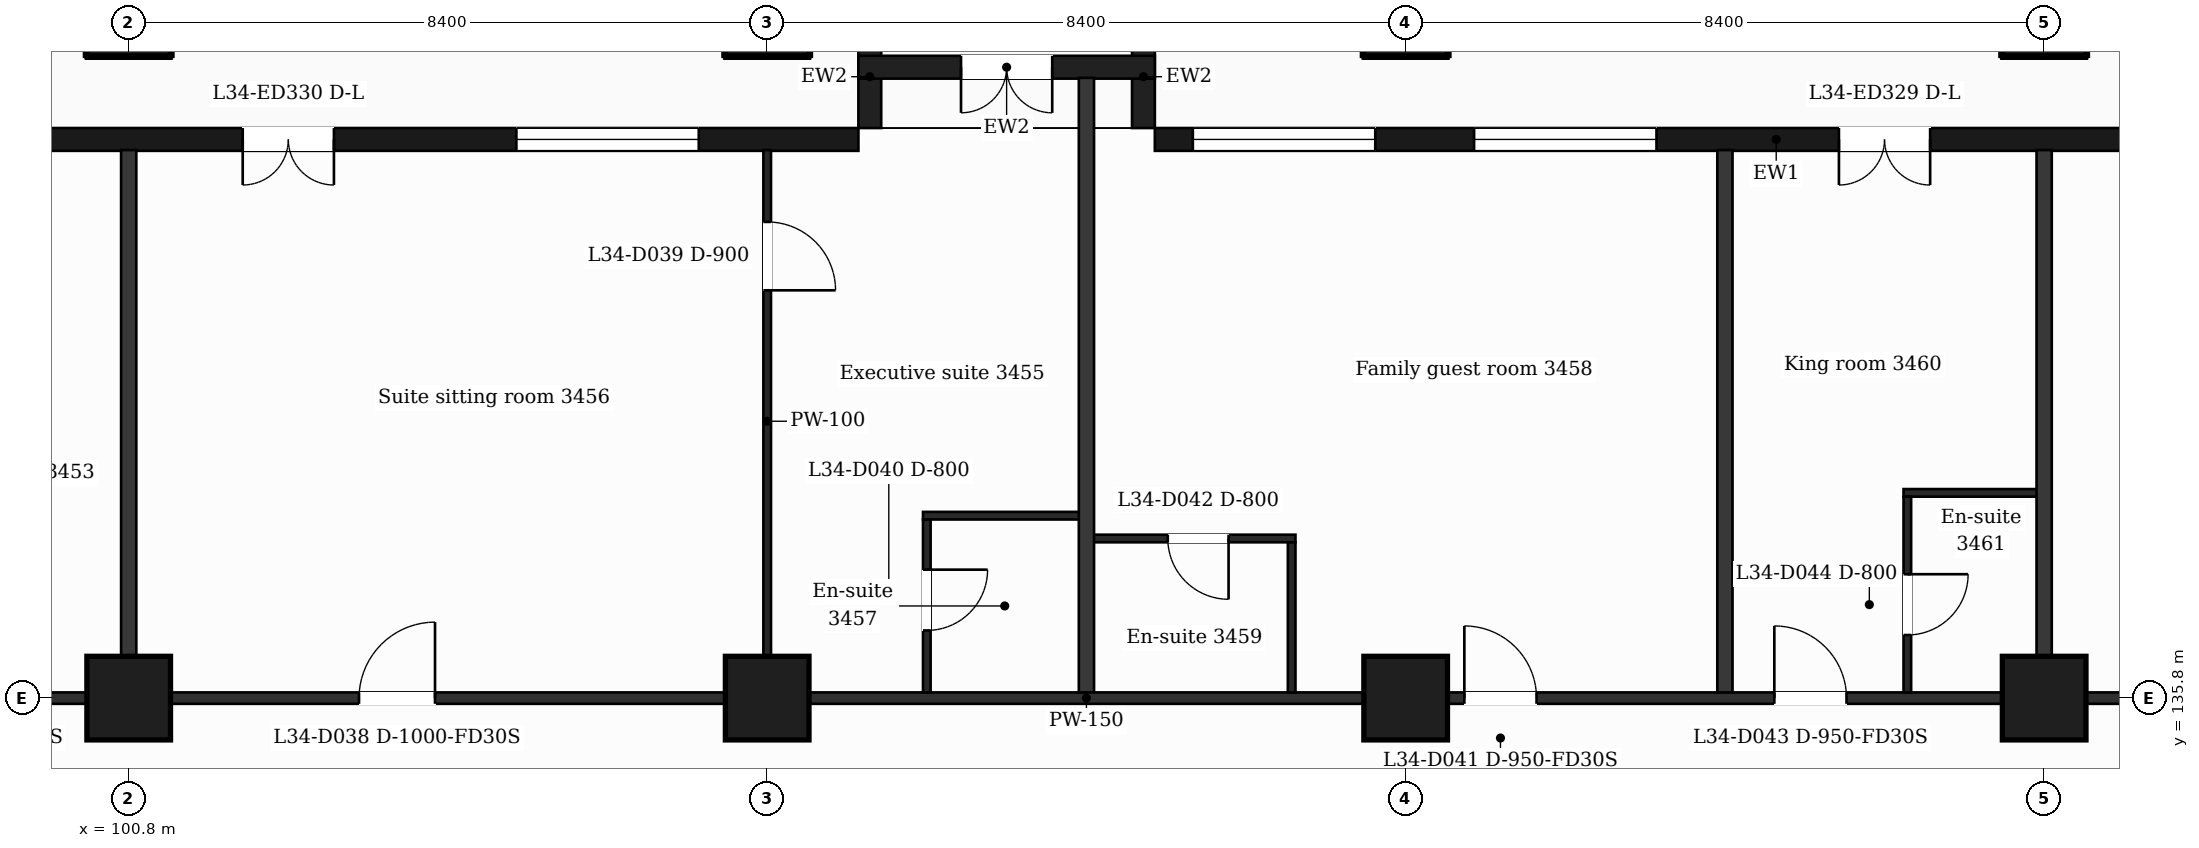
"""IFC4 building model, lengths in metres.
Left out: names, types, materials, properties, quantities, classifications, styles, units other than length and angle.
Written with IfcOpenShell. Run it as: python <this file> out.ifc"""

import sys

from ifc_helpers import new_model, si_unit, direction, frame, frame_2d, origin, origin_2d, place, context, subcontext, project, spatial, rectangle, extrude, element, fill, save


model = new_model("IFC4")
c1 = context("Model", 3, precision=1e-05, world=origin(), true_north=direction((0.0, 1.0)))
c2 = subcontext(c1, "Body", "Model", "MODEL_VIEW")
j1 = project(units=[si_unit("LENGTHUNIT", "METRE"), si_unit("PLANEANGLEUNIT", "RADIAN")], contexts=[c1])
p1 = place(None, origin())
s1 = spatial("IfcSite", under=j1, at=p1, CompositionType="ELEMENT")
p2 = place(p1, origin())
s2 = spatial("IfcBuilding", under=s1, at=p2, CompositionType="ELEMENT")
p3 = place(p2, frame((0.0, 0.0, 147.8)))
s3 = spatial("IfcBuildingStorey", under=s2, at=p3, CompositionType="ELEMENT", Elevation=147.8)
for number, where, z_axis, x_axis in (
    (1, (100.8, 135.8, 0.0), (0.0, 0.0, 1.0), (1.0, 0.0, 0.0)),
    (2, (109.2, 135.8, 0.0), (0.0, 0.0, 1.0), (1.0, 0.0, 0.0)),
    (3, (117.6, 135.8, 0.0), (0.0, 0.0, 1.0), (1.0, 0.0, 0.0)),
    (4, (126.0, 135.8, 0.0), (0.0, 0.0, 1.0), (1.0, 0.0, 0.0)),
    (5, (100.8, 144.8, 0.0), (0.0, 0.0, 1.0), (1.0, 0.0, 0.0)),
    (6, (109.2, 144.8, 0.0), (0.0, 0.0, 1.0), (1.0, 0.0, 0.0)),
    (7, (117.6, 144.8, 0.0), (0.0, 0.0, 1.0), (1.0, 0.0, 0.0)),
    (8, (126.0, 144.8, 0.0), (0.0, 0.0, 1.0), (1.0, 0.0, 0.0)),
):
    element("IfcColumn", number, at=place(p3, frame(where, z_axis=z_axis, x_axis=x_axis)), inside=s3, PredefinedType="COLUMN", context=c2, shape_type="SweptSolid", body=[
        extrude(rectangle(XDim=1.1, YDim=1.1, at=origin_2d()), origin(), (0.0, 0.0, 1.0), 3.7),
    ])
p4 = place(p3, frame((130.65, 143.15, 0.0), z_axis=(0.0, 0.0, 1.0), x_axis=(-1.0, 0.0, 0.0)))
e9 = element("IfcWall", 9, at=p4, inside=s3, PredefinedType="SOLIDWALL", context=c2, shape_type="SweptSolid", body=[
    extrude(rectangle(XDim=16.35, YDim=0.3, at=frame_2d((8.175, 0.0))), origin(), (0.0, 0.0, 1.0), 3.38),
])
p5 = place(p4, frame((1.95, 0.0, 0.9)))
e10 = element("IfcOpeningElement", 10, at=p5, cuts=e9, PredefinedType="OPENING", context=c2, shape_type="SweptSolid", body=[
    extrude(rectangle(XDim=1.2, YDim=2.1, at=frame_2d((0.6, 1.05))), frame((0.0, 0.16, 0.0), z_axis=(0.0, -1.0, 0.0), x_axis=(1.0, 0.0, 0.0)), (0.0, 0.0, 1.0), 0.32),
])
p6 = place(p4, frame((6.15, 0.0, 0.0)))
e11 = element("IfcOpeningElement", 11, at=p6, cuts=e9, PredefinedType="OPENING", context=c2, shape_type="SweptSolid", body=[
    extrude(rectangle(XDim=1.2, YDim=2.4, at=frame_2d((0.6, 1.2))), frame((0.0, 0.16, 0.0), z_axis=(0.0, -1.0, 0.0), x_axis=(1.0, 0.0, 0.0)), (0.0, 0.0, 1.0), 0.32),
])
p7 = place(p4, frame((9.75, 0.0, 0.9)))
e12 = element("IfcOpeningElement", 12, at=p7, cuts=e9, PredefinedType="OPENING", context=c2, shape_type="SweptSolid", body=[
    extrude(rectangle(XDim=2.4, YDim=2.1, at=frame_2d((1.2, 1.05))), frame((0.0, 0.16, 0.0), z_axis=(0.0, -1.0, 0.0), x_axis=(1.0, 0.0, 0.0)), (0.0, 0.0, 1.0), 0.32),
])
p8 = place(p4, frame((13.45, 0.0, 0.9)))
e13 = element("IfcOpeningElement", 13, at=p8, cuts=e9, PredefinedType="OPENING", context=c2, shape_type="SweptSolid", body=[
    extrude(rectangle(XDim=2.4, YDim=2.1, at=frame_2d((1.2, 1.05))), frame((0.0, 0.16, 0.0), z_axis=(0.0, -1.0, 0.0), x_axis=(1.0, 0.0, 0.0)), (0.0, 0.0, 1.0), 0.32),
])
p9 = place(p3, frame((110.4, 143.15, 0.0), z_axis=(0.0, 0.0, 1.0), x_axis=(-1.0, 0.0, 0.0)))
e14 = element("IfcWall", 14, at=p9, inside=s3, PredefinedType="SOLIDWALL", context=c2, shape_type="SweptSolid", body=[
    extrude(rectangle(XDim=14.4, YDim=0.3, at=frame_2d((7.2, 0.0))), origin(), (0.0, 0.0, 1.0), 3.38),
])
p10 = place(p9, frame((2.1, 0.0, 0.9)))
e15 = element("IfcOpeningElement", 15, at=p10, cuts=e14, PredefinedType="OPENING", context=c2, shape_type="SweptSolid", body=[
    extrude(rectangle(XDim=2.4, YDim=2.1, at=frame_2d((1.2, 1.05))), frame((0.0, 0.16, 0.0), z_axis=(0.0, -1.0, 0.0), x_axis=(1.0, 0.0, 0.0)), (0.0, 0.0, 1.0), 0.32),
])
p11 = place(p9, frame((6.9, 0.0, 0.0)))
e16 = element("IfcOpeningElement", 16, at=p11, cuts=e14, PredefinedType="OPENING", context=c2, shape_type="SweptSolid", body=[
    extrude(rectangle(XDim=1.2, YDim=2.4, at=frame_2d((0.6, 1.2))), frame((0.0, 0.16, 0.0), z_axis=(0.0, -1.0, 0.0), x_axis=(1.0, 0.0, 0.0)), (0.0, 0.0, 1.0), 0.32),
])
p12 = place(p9, frame((11.1, 0.0, 0.9)))
e17 = element("IfcOpeningElement", 17, at=p12, cuts=e14, PredefinedType="OPENING", context=c2, shape_type="SweptSolid", body=[
    extrude(rectangle(XDim=1.2, YDim=2.1, at=frame_2d((0.6, 1.05))), frame((0.0, 0.16, 0.0), z_axis=(0.0, -1.0, 0.0), x_axis=(1.0, 0.0, 0.0)), (0.0, 0.0, 1.0), 0.32),
])
for number, where, z_axis, x_axis in (
    (18, (114.15, 143.3, 0.0), (0.0, 0.0, 1.0), (0.0, 1.0, 0.0)),
    (19, (110.55, 143.3, 0.0), (0.0, 0.0, 1.0), (0.0, 1.0, 0.0)),
):
    element("IfcWall", number, at=place(p3, frame(where, z_axis=z_axis, x_axis=x_axis)), inside=s3, PredefinedType="SOLIDWALL", context=c2, shape_type="SweptSolid", body=[
        extrude(rectangle(XDim=1.35, YDim=0.3, at=frame_2d((0.675, 0.0))), origin(), (0.0, 0.0, 1.0), 3.38),
    ])
p13 = place(p3, frame((114.3, 144.1, 0.0), z_axis=(0.0, 0.0, 1.0), x_axis=(-1.0, 0.0, 0.0)))
e20 = element("IfcWall", 20, at=p13, inside=s3, PredefinedType="SOLIDWALL", context=c2, shape_type="SweptSolid", body=[
    extrude(rectangle(XDim=3.9, YDim=0.3, at=frame_2d((1.95, 0.0))), origin(), (0.0, 0.0, 1.0), 3.38),
])
p14 = place(p13, frame((1.35, 0.0, 0.0)))
e21 = element("IfcOpeningElement", 21, at=p14, cuts=e20, PredefinedType="OPENING", context=c2, shape_type="SweptSolid", body=[
    extrude(rectangle(XDim=1.2, YDim=2.4, at=frame_2d((0.6, 1.2))), frame((0.0, 0.16, 0.0), z_axis=(0.0, -1.0, 0.0), x_axis=(1.0, 0.0, 0.0)), (0.0, 0.0, 1.0), 0.32),
])
p15 = place(p3, frame((90.895, 135.8, 0.0), z_axis=(0.0, 0.0, 1.0), x_axis=(1.0, 0.0, 0.0)))
e22 = element("IfcWall", 22, at=p15, inside=s3, PredefinedType="PARTITIONING", context=c2, shape_type="SweptSolid", body=[
    extrude(rectangle(XDim=45.011, YDim=0.15, at=frame_2d((22.505, 0.0))), origin(), (0.0, 0.0, 1.0), 3.38),
])
p16 = place(p15, frame((6.906, 0.0, 0.0)))
e23 = element("IfcOpeningElement", 23, at=p16, cuts=e22, PredefinedType="OPENING", context=c2, shape_type="SweptSolid", body=[
    extrude(rectangle(XDim=1.0, YDim=2.1, at=frame_2d((0.5, 1.05))), frame((0.0, 0.085, 0.0), z_axis=(0.0, -1.0, 0.0), x_axis=(1.0, 0.0, 0.0)), (0.0, 0.0, 1.0), 0.17),
])
p17 = place(p15, frame((12.935, 0.0, 0.0)))
e24 = element("IfcOpeningElement", 24, at=p17, cuts=e22, PredefinedType="OPENING", context=c2, shape_type="SweptSolid", body=[
    extrude(rectangle(XDim=1.0, YDim=2.1, at=frame_2d((0.5, 1.05))), frame((0.0, 0.085, 0.0), z_axis=(0.0, -1.0, 0.0), x_axis=(1.0, 0.0, 0.0)), (0.0, 0.0, 1.0), 0.17),
])
p18 = place(p15, frame((27.477, 0.0, 0.0)))
e25 = element("IfcOpeningElement", 25, at=p18, cuts=e22, PredefinedType="OPENING", context=c2, shape_type="SweptSolid", body=[
    extrude(rectangle(XDim=0.95, YDim=2.1, at=frame_2d((0.475, 1.05))), frame((0.0, 0.085, 0.0), z_axis=(0.0, -1.0, 0.0), x_axis=(1.0, 0.0, 0.0)), (0.0, 0.0, 1.0), 0.17),
])
p19 = place(p15, frame((31.555, 0.0, 0.0)))
e26 = element("IfcOpeningElement", 26, at=p19, cuts=e22, PredefinedType="OPENING", context=c2, shape_type="SweptSolid", body=[
    extrude(rectangle(XDim=0.95, YDim=2.1, at=frame_2d((0.475, 1.05))), frame((0.0, 0.085, 0.0), z_axis=(0.0, -1.0, 0.0), x_axis=(1.0, 0.0, 0.0)), (0.0, 0.0, 1.0), 0.17),
])
p20 = place(p15, frame((39.814, 0.0, 0.0)))
e27 = element("IfcOpeningElement", 27, at=p20, cuts=e22, PredefinedType="OPENING", context=c2, shape_type="SweptSolid", body=[
    extrude(rectangle(XDim=0.95, YDim=2.1, at=frame_2d((0.475, 1.05))), frame((0.0, 0.085, 0.0), z_axis=(0.0, -1.0, 0.0), x_axis=(1.0, 0.0, 0.0)), (0.0, 0.0, 1.0), 0.17),
])
p21 = place(p3, frame((113.4, 137.9, 0.0), z_axis=(0.0, 0.0, 1.0), x_axis=(1.0, 0.0, 0.0)))
e28 = element("IfcWall", 28, at=p21, inside=s3, PredefinedType="PARTITIONING", context=c2, shape_type="SweptSolid", body=[
    extrude(rectangle(XDim=2.75, YDim=0.1, at=frame_2d((1.375, 0.0))), origin(), (0.0, 0.0, 1.0), 3.38),
])
p22 = place(p21, frame((1.07, 0.0, 0.0)))
e29 = element("IfcOpeningElement", 29, at=p22, cuts=e28, PredefinedType="OPENING", context=c2, shape_type="SweptSolid", body=[
    extrude(rectangle(XDim=0.8, YDim=2.1, at=frame_2d((0.4, 1.05))), frame((0.0, 0.06, 0.0), z_axis=(0.0, -1.0, 0.0), x_axis=(1.0, 0.0, 0.0)), (0.0, 0.0, 1.0), 0.12),
])
p23 = place(p3, frame((111.25, 138.2, 0.0), z_axis=(0.0, 0.0, 1.0), x_axis=(1.0, 0.0, 0.0)))
e30 = element("IfcWall", 30, at=p23, inside=s3, PredefinedType="PARTITIONING", context=c2, shape_type="SweptSolid", body=[
    extrude(rectangle(XDim=2.15, YDim=0.1, at=frame_2d((1.075, 0.0))), origin(), (0.0, 0.0, 1.0), 3.38),
])
p24 = place(p3, frame((124.15, 138.5, 0.0), z_axis=(0.0, 0.0, 1.0), x_axis=(1.0, 0.0, 0.0)))
e31 = element("IfcWall", 31, at=p24, inside=s3, PredefinedType="PARTITIONING", context=c2, shape_type="SweptSolid", body=[
    extrude(rectangle(XDim=1.85, YDim=0.1, at=frame_2d((0.925, 0.0))), origin(), (0.0, 0.0, 1.0), 3.38),
])
p25 = place(p3, frame((100.8, 135.875, 0.0), z_axis=(0.0, 0.0, 1.0), x_axis=(0.0, 1.0, 0.0)))
e32 = element("IfcWall", 32, at=p25, inside=s3, PredefinedType="PARTITIONING", context=c2, shape_type="SweptSolid", body=[
    extrude(rectangle(XDim=7.135, YDim=0.2, at=frame_2d((3.567, 0.0))), origin(), (0.0, 0.0, 1.0), 3.38),
])
p26 = place(p3, frame((109.2, 135.875, 0.0), z_axis=(0.0, 0.0, 1.0), x_axis=(0.0, 1.0, 0.0)))
e33 = element("IfcWall", 33, at=p26, inside=s3, PredefinedType="PARTITIONING", context=c2, shape_type="SweptSolid", body=[
    extrude(rectangle(XDim=7.135, YDim=0.1, at=frame_2d((3.567, 0.0))), origin(), (0.0, 0.0, 1.0), 3.38),
])
p27 = place(p26, frame((5.29, 0.0, 0.0)))
e34 = element("IfcOpeningElement", 34, at=p27, cuts=e33, PredefinedType="OPENING", context=c2, shape_type="SweptSolid", body=[
    extrude(rectangle(XDim=0.9, YDim=2.1, at=frame_2d((0.45, 1.05))), frame((0.0, 0.06, 0.0), z_axis=(0.0, -1.0, 0.0), x_axis=(1.0, 0.0, 0.0)), (0.0, 0.0, 1.0), 0.12),
])
p28 = place(p3, frame((111.3, 135.875, 0.0), z_axis=(0.0, 0.0, 1.0), x_axis=(0.0, 1.0, 0.0)))
e35 = element("IfcWall", 35, at=p28, inside=s3, PredefinedType="PARTITIONING", context=c2, shape_type="SweptSolid", body=[
    extrude(rectangle(XDim=2.275, YDim=0.1, at=frame_2d((1.137, 0.0))), origin(), (0.0, 0.0, 1.0), 3.38),
])
p29 = place(p28, frame((0.815, 0.0, 0.0)))
e36 = element("IfcOpeningElement", 36, at=p29, cuts=e35, PredefinedType="OPENING", context=c2, shape_type="SweptSolid", body=[
    extrude(rectangle(XDim=0.8, YDim=2.1, at=frame_2d((0.4, 1.05))), frame((0.0, 0.06, 0.0), z_axis=(0.0, -1.0, 0.0), x_axis=(1.0, 0.0, 0.0)), (0.0, 0.0, 1.0), 0.12),
])
p30 = place(p3, frame((113.4, 135.875, 0.0), z_axis=(0.0, 0.0, 1.0), x_axis=(0.0, 1.0, 0.0)))
e37 = element("IfcWall", 37, at=p30, inside=s3, PredefinedType="PARTITIONING", context=c2, shape_type="SweptSolid", body=[
    extrude(rectangle(XDim=8.085, YDim=0.2, at=frame_2d((4.042, 0.0))), origin(), (0.0, 0.0, 1.0), 3.38),
])
p31 = place(p3, frame((116.1, 135.875, 0.0), z_axis=(0.0, 0.0, 1.0), x_axis=(0.0, 1.0, 0.0)))
e38 = element("IfcWall", 38, at=p31, inside=s3, PredefinedType="PARTITIONING", context=c2, shape_type="SweptSolid", body=[
    extrude(rectangle(XDim=1.975, YDim=0.1, at=frame_2d((0.988, 0.0))), origin(), (0.0, 0.0, 1.0), 3.38),
])
p32 = place(p3, frame((121.8, 135.875, 0.0), z_axis=(0.0, 0.0, 1.0), x_axis=(0.0, 1.0, 0.0)))
e39 = element("IfcWall", 39, at=p32, inside=s3, PredefinedType="PARTITIONING", context=c2, shape_type="SweptSolid", body=[
    extrude(rectangle(XDim=7.135, YDim=0.2, at=frame_2d((3.567, 0.0))), origin(), (0.0, 0.0, 1.0), 3.38),
])
p33 = place(p3, frame((124.2, 135.875, 0.0), z_axis=(0.0, 0.0, 1.0), x_axis=(0.0, 1.0, 0.0)))
e40 = element("IfcWall", 40, at=p33, inside=s3, PredefinedType="PARTITIONING", context=c2, shape_type="SweptSolid", body=[
    extrude(rectangle(XDim=2.575, YDim=0.1, at=frame_2d((1.288, 0.0))), origin(), (0.0, 0.0, 1.0), 3.38),
])
p34 = place(p33, frame((0.755, 0.0, 0.0)))
e41 = element("IfcOpeningElement", 41, at=p34, cuts=e40, PredefinedType="OPENING", context=c2, shape_type="SweptSolid", body=[
    extrude(rectangle(XDim=0.8, YDim=2.1, at=frame_2d((0.4, 1.05))), frame((0.0, 0.06, 0.0), z_axis=(0.0, -1.0, 0.0), x_axis=(1.0, 0.0, 0.0)), (0.0, 0.0, 1.0), 0.12),
])
p35 = place(p3, frame((126.0, 135.875, 0.0), z_axis=(0.0, 0.0, 1.0), x_axis=(0.0, 1.0, 0.0)))
e42 = element("IfcWall", 42, at=p35, inside=s3, PredefinedType="PARTITIONING", context=c2, shape_type="SweptSolid", body=[
    extrude(rectangle(XDim=7.135, YDim=0.2, at=frame_2d((3.567, 0.0))), origin(), (0.0, 0.0, 1.0), 3.38),
])
p36 = place(p6, origin())
e43 = element("IfcDoor", 43, at=p36, inside=s3, OperationType="DOUBLE_DOOR_SINGLE_SWING", PredefinedType="DOOR", context=c2, shape_type="SweptSolid", body=[
    extrude(rectangle(XDim=1.2, YDim=2.4, at=frame_2d((0.6, 1.2))), frame((0.0, 0.025, 0.0), z_axis=(0.0, -1.0, 0.0), x_axis=(1.0, 0.0, 0.0)), (0.0, 0.0, 1.0), 0.05),
])
fill(e11, e43)
p37 = place(p7, origin())
e44 = element("IfcWindow", 44, at=p37, inside=s3, PartitioningType="SINGLE_PANEL", PredefinedType="WINDOW", context=c2, shape_type="SweptSolid", body=[
    extrude(rectangle(XDim=2.4, YDim=2.1, at=frame_2d((1.2, 1.05))), frame((0.0, 0.03, 0.0), z_axis=(0.0, -1.0, 0.0), x_axis=(1.0, 0.0, 0.0)), (0.0, 0.0, 1.0), 0.06),
])
fill(e12, e44)
p38 = place(p8, origin())
e45 = element("IfcWindow", 45, at=p38, inside=s3, PartitioningType="SINGLE_PANEL", PredefinedType="WINDOW", context=c2, shape_type="SweptSolid", body=[
    extrude(rectangle(XDim=2.4, YDim=2.1, at=frame_2d((1.2, 1.05))), frame((0.0, 0.03, 0.0), z_axis=(0.0, -1.0, 0.0), x_axis=(1.0, 0.0, 0.0)), (0.0, 0.0, 1.0), 0.06),
])
fill(e13, e45)
p39 = place(p10, origin())
e46 = element("IfcWindow", 46, at=p39, inside=s3, PartitioningType="SINGLE_PANEL", PredefinedType="WINDOW", context=c2, shape_type="SweptSolid", body=[
    extrude(rectangle(XDim=2.4, YDim=2.1, at=frame_2d((1.2, 1.05))), frame((0.0, 0.03, 0.0), z_axis=(0.0, -1.0, 0.0), x_axis=(1.0, 0.0, 0.0)), (0.0, 0.0, 1.0), 0.06),
])
fill(e15, e46)
p40 = place(p11, origin())
e47 = element("IfcDoor", 47, at=p40, inside=s3, OperationType="DOUBLE_DOOR_SINGLE_SWING", PredefinedType="DOOR", context=c2, shape_type="SweptSolid", body=[
    extrude(rectangle(XDim=1.2, YDim=2.4, at=frame_2d((0.6, 1.2))), frame((0.0, 0.025, 0.0), z_axis=(0.0, -1.0, 0.0), x_axis=(1.0, 0.0, 0.0)), (0.0, 0.0, 1.0), 0.05),
])
fill(e16, e47)
p41 = place(p14, origin())
e48 = element("IfcDoor", 48, at=p41, inside=s3, OperationType="DOUBLE_DOOR_SINGLE_SWING", PredefinedType="DOOR", context=c2, shape_type="SweptSolid", body=[
    extrude(rectangle(XDim=1.2, YDim=2.4, at=frame_2d((0.6, 1.2))), frame((0.0, 0.025, 0.0), z_axis=(0.0, -1.0, 0.0), x_axis=(1.0, 0.0, 0.0)), (0.0, 0.0, 1.0), 0.05),
])
fill(e21, e48)
p42 = place(p17, origin())
e49 = element("IfcDoor", 49, at=p42, inside=s3, OperationType="SINGLE_SWING_RIGHT", PredefinedType="DOOR", context=c2, shape_type="SweptSolid", body=[
    extrude(rectangle(XDim=1.0, YDim=2.1, at=frame_2d((0.5, 1.05))), frame((0.0, 0.025, 0.0), z_axis=(0.0, -1.0, 0.0), x_axis=(1.0, 0.0, 0.0)), (0.0, 0.0, 1.0), 0.05),
])
fill(e24, e49)
p43 = place(p27, origin())
e50 = element("IfcDoor", 50, at=p43, inside=s3, OperationType="SINGLE_SWING_LEFT", PredefinedType="DOOR", context=c2, shape_type="SweptSolid", body=[
    extrude(rectangle(XDim=0.9, YDim=2.1, at=frame_2d((0.45, 1.05))), frame((0.0, 0.025, 0.0), z_axis=(0.0, -1.0, 0.0), x_axis=(1.0, 0.0, 0.0)), (0.0, 0.0, 1.0), 0.05),
])
fill(e34, e50)
p44 = place(p29, origin())
e51 = element("IfcDoor", 51, at=p44, inside=s3, OperationType="SINGLE_SWING_RIGHT", PredefinedType="DOOR", context=c2, shape_type="SweptSolid", body=[
    extrude(rectangle(XDim=0.8, YDim=2.1, at=frame_2d((0.4, 1.05))), frame((0.0, 0.025, 0.0), z_axis=(0.0, -1.0, 0.0), x_axis=(1.0, 0.0, 0.0)), (0.0, 0.0, 1.0), 0.05),
])
fill(e36, e51)
p45 = place(p18, origin())
e52 = element("IfcDoor", 52, at=p45, inside=s3, OperationType="SINGLE_SWING_LEFT", PredefinedType="DOOR", context=c2, shape_type="SweptSolid", body=[
    extrude(rectangle(XDim=0.95, YDim=2.1, at=frame_2d((0.475, 1.05))), frame((0.0, 0.025, 0.0), z_axis=(0.0, -1.0, 0.0), x_axis=(1.0, 0.0, 0.0)), (0.0, 0.0, 1.0), 0.05),
])
fill(e25, e52)
p46 = place(p22, origin())
e53 = element("IfcDoor", 53, at=p46, inside=s3, OperationType="SINGLE_SWING_RIGHT", PredefinedType="DOOR", context=c2, shape_type="SweptSolid", body=[
    extrude(rectangle(XDim=0.8, YDim=2.1, at=frame_2d((0.4, 1.05))), frame((0.0, 0.025, 0.0), z_axis=(0.0, -1.0, 0.0), x_axis=(1.0, 0.0, 0.0)), (0.0, 0.0, 1.0), 0.05),
])
fill(e29, e53)
p47 = place(p19, origin())
e54 = element("IfcDoor", 54, at=p47, inside=s3, OperationType="SINGLE_SWING_LEFT", PredefinedType="DOOR", context=c2, shape_type="SweptSolid", body=[
    extrude(rectangle(XDim=0.95, YDim=2.1, at=frame_2d((0.475, 1.05))), frame((0.0, 0.025, 0.0), z_axis=(0.0, -1.0, 0.0), x_axis=(1.0, 0.0, 0.0)), (0.0, 0.0, 1.0), 0.05),
])
fill(e26, e54)
p48 = place(p34, origin())
e55 = element("IfcDoor", 55, at=p48, inside=s3, OperationType="SINGLE_SWING_RIGHT", PredefinedType="DOOR", context=c2, shape_type="SweptSolid", body=[
    extrude(rectangle(XDim=0.8, YDim=2.1, at=frame_2d((0.4, 1.05))), frame((0.0, 0.025, 0.0), z_axis=(0.0, -1.0, 0.0), x_axis=(1.0, 0.0, 0.0)), (0.0, 0.0, 1.0), 0.05),
])
fill(e41, e55)
save(model, sys.argv[1])
